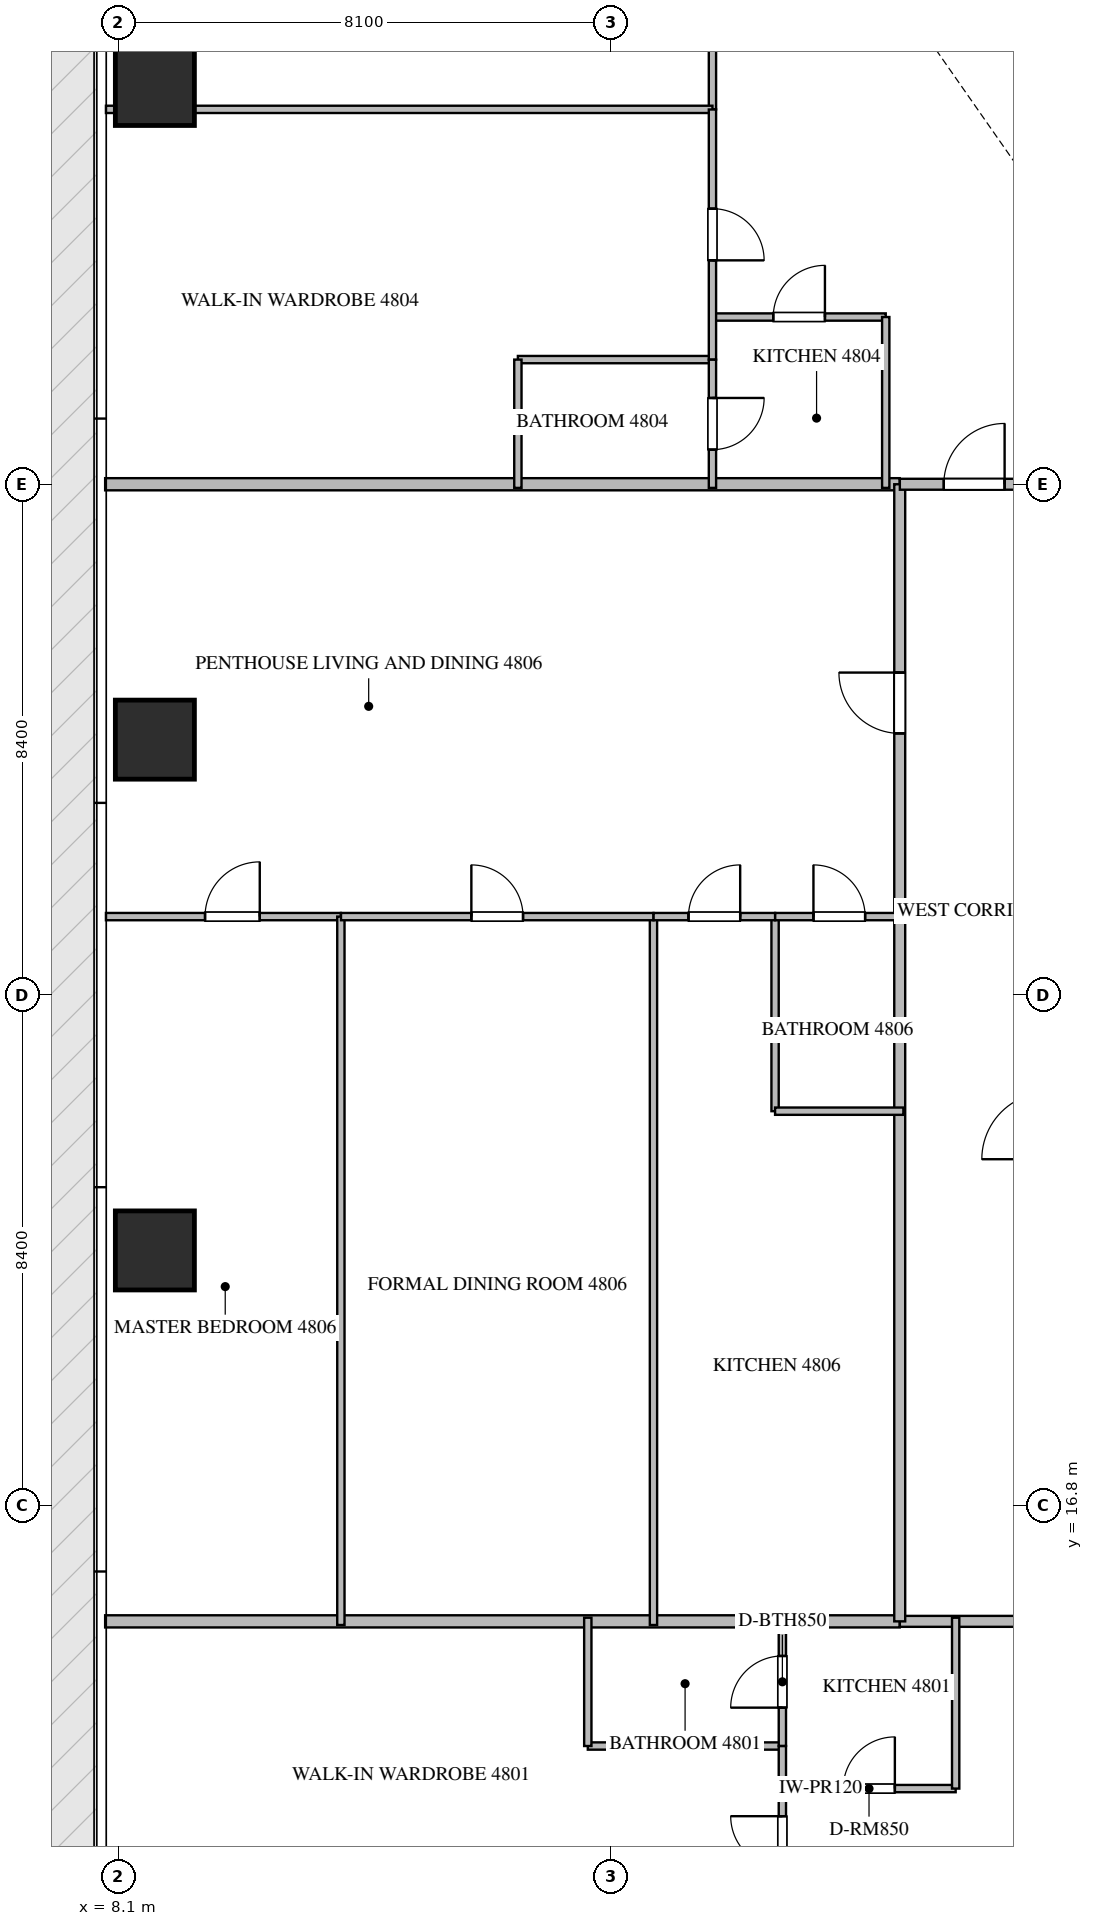
"""IFC4 building model, lengths in metres.
Left out: names, types, materials, properties, quantities, classifications, styles, units other than length and angle.
Written with IfcOpenShell. Run it as: python <this file> out.ifc"""

import sys

from ifc_helpers import new_model, si_unit, direction, frame, frame_2d, origin, origin_2d, place, context, subcontext, project, spatial, rectangle, extrude, source, transform, mapped, element, fill, save


model = new_model("IFC4")
c1 = context("Model", 3, precision=1e-05, world=origin(), true_north=direction((0.0, 1.0)))
c2 = subcontext(c1, "Body", "Model", "MODEL_VIEW")
j1 = project(units=[si_unit("LENGTHUNIT", "METRE"), si_unit("PLANEANGLEUNIT", "RADIAN")], contexts=[c1])
p1 = place(None, origin())
s1 = spatial("IfcSite", under=j1, at=p1, CompositionType="ELEMENT")
p2 = place(p1, origin())
s2 = spatial("IfcBuilding", under=s1, at=p2, CompositionType="ELEMENT")
p3 = place(p2, frame((0.0, 0.0, 191.4)))
s3 = spatial("IfcBuildingStorey", under=s2, at=p3, CompositionType="ELEMENT", Elevation=191.4)
m1 = source(origin(), c2, "Body", "SweptSolid", [
    extrude(rectangle(XDim=1.3, YDim=1.3, at=origin_2d()), origin(), (0.0, 0.0, 1.0), 3.75),
])
for number, where, z_axis, x_axis in (
    (1, (8.7, 21.0, -0.26), (0.0, 0.0, 1.0), (1.0, 0.0, 0.0)),
    (2, (8.7, 29.4, -0.26), (0.0, 0.0, 1.0), (1.0, 0.0, 0.0)),
    (3, (8.7, 40.15, -0.26), (0.0, 0.0, 1.0), (1.0, 0.0, 0.0)),
):
    element("IfcColumn", number, at=place(p3, frame(where, z_axis=z_axis, x_axis=x_axis)), inside=s3, PredefinedType="COLUMN", context=c2, shape_type="MappedRepresentation", body=[
        mapped(m1, transform((0.0, 0.0, 0.0), scale=1.0)),
    ])
for number, where, z_axis, x_axis in (
    (4, (7.882, 14.9, 0.0), (0.0, 0.0, 1.0), (1.0, 0.0, 0.0)),
    (5, (7.882, 33.6, 0.0), (0.0, 0.0, 1.0), (1.0, 0.0, 0.0)),
):
    element("IfcWall", number, at=place(p3, frame(where, z_axis=z_axis, x_axis=x_axis)), inside=s3, PredefinedType="PARTITIONING", context=c2, shape_type="SweptSolid", body=[
        extrude(rectangle(XDim=13.068, YDim=0.2, at=frame_2d((6.534, 0.0))), origin(), (0.0, 0.0, 1.0), 3.49),
    ])
p4 = place(p3, frame((20.952, 14.9, 0.0), z_axis=(0.0, 0.0, 1.0), x_axis=(1.0, 0.0, 0.0)))
e6 = element("IfcWall", 6, at=p4, inside=s3, PredefinedType="PARTITIONING", context=c2, shape_type="SweptSolid", body=[
    extrude(rectangle(XDim=22.896, YDim=0.18, at=frame_2d((11.448, 0.0))), origin(), (0.0, 0.0, 1.0), 3.49),
])
p5 = place(p4, frame((2.387, 0.0, 0.0)))
e7 = element("IfcOpeningElement", 7, at=p5, cuts=e6, PredefinedType="OPENING", context=c2, shape_type="SweptSolid", body=[
    extrude(rectangle(XDim=1.0, YDim=2.15, at=frame_2d((0.5, 1.075))), frame((0.0, 0.1, 0.0), z_axis=(0.0, -1.0, 0.0), x_axis=(1.0, 0.0, 0.0)), (0.0, 0.0, 1.0), 0.2),
])
p6 = place(p4, frame((14.867, 0.0, 0.0)))
e8 = element("IfcOpeningElement", 8, at=p6, cuts=e6, PredefinedType="OPENING", context=c2, shape_type="SweptSolid", body=[
    extrude(rectangle(XDim=1.0, YDim=2.15, at=frame_2d((0.5, 1.075))), frame((0.0, 0.1, 0.0), z_axis=(0.0, -1.0, 0.0), x_axis=(1.0, 0.0, 0.0)), (0.0, 0.0, 1.0), 0.2),
])
p7 = place(p4, frame((19.356, 0.0, 0.0)))
e9 = element("IfcOpeningElement", 9, at=p7, cuts=e6, PredefinedType="OPENING", context=c2, shape_type="SweptSolid", body=[
    extrude(rectangle(XDim=1.0, YDim=2.15, at=frame_2d((0.5, 1.075))), frame((0.0, 0.1, 0.0), z_axis=(0.0, -1.0, 0.0), x_axis=(1.0, 0.0, 0.0)), (0.0, 0.0, 1.0), 0.2),
])
p8 = place(p3, frame((20.95, 14.9, 0.0), z_axis=(0.0, 0.0, 1.0), x_axis=(0.0, 1.0, 0.0)))
e10 = element("IfcWall", 10, at=p8, inside=s3, PredefinedType="PARTITIONING", context=c2, shape_type="SweptSolid", body=[
    extrude(rectangle(XDim=18.7, YDim=0.18, at=frame_2d((9.35, 0.0))), origin(), (0.0, 0.0, 1.0), 3.49),
])
p9 = place(p8, frame((14.603, 0.0, 0.0)))
e11 = element("IfcOpeningElement", 11, at=p9, cuts=e10, PredefinedType="OPENING", context=c2, shape_type="SweptSolid", body=[
    extrude(rectangle(XDim=1.0, YDim=2.15, at=frame_2d((0.5, 1.075))), frame((0.0, 0.1, 0.0), z_axis=(0.0, -1.0, 0.0), x_axis=(1.0, 0.0, 0.0)), (0.0, 0.0, 1.0), 0.2),
])
p10 = place(p3, frame((20.952, 33.6, 0.0), z_axis=(0.0, 0.0, 1.0), x_axis=(1.0, 0.0, 0.0)))
e12 = element("IfcWall", 12, at=p10, inside=s3, PredefinedType="PARTITIONING", context=c2, shape_type="SweptSolid", body=[
    extrude(rectangle(XDim=2.446, YDim=0.18, at=frame_2d((1.223, 0.0))), origin(), (0.0, 0.0, 1.0), 3.49),
])
p11 = place(p10, frame((0.723, 0.0, 0.0)))
e13 = element("IfcOpeningElement", 13, at=p11, cuts=e12, PredefinedType="OPENING", context=c2, shape_type="SweptSolid", body=[
    extrude(rectangle(XDim=1.0, YDim=2.15, at=frame_2d((0.5, 1.075))), frame((0.0, 0.1, 0.0), z_axis=(0.0, -1.0, 0.0), x_axis=(1.0, 0.0, 0.0)), (0.0, 0.0, 1.0), 0.2),
])
p12 = place(p3, frame((19.02, 12.15, 0.0), z_axis=(0.0, 0.0, 1.0), x_axis=(1.0, 0.0, 0.0)))
e14 = element("IfcWall", 14, at=p12, inside=s3, PredefinedType="PARTITIONING", context=c2, shape_type="SweptSolid", body=[
    extrude(rectangle(XDim=2.85, YDim=0.12, at=frame_2d((1.425, 0.0))), origin(), (0.0, 0.0, 1.0), 3.49),
])
p13 = place(p12, frame((1.0, 0.0, 0.0)))
e15 = element("IfcOpeningElement", 15, at=p13, cuts=e14, PredefinedType="OPENING", context=c2, shape_type="SweptSolid", body=[
    extrude(rectangle(XDim=0.85, YDim=2.1, at=frame_2d((0.425, 1.05))), frame((0.0, 0.07, 0.0), z_axis=(0.0, -1.0, 0.0), x_axis=(1.0, 0.0, 0.0)), (0.0, 0.0, 1.0), 0.14),
])
p14 = place(p3, frame((21.87, 12.15, 0.0), z_axis=(0.0, 0.0, 1.0), x_axis=(0.0, 1.0, 0.0)))
e16 = element("IfcWall", 16, at=p14, inside=s3, PredefinedType="PARTITIONING", context=c2, shape_type="SweptSolid", body=[
    extrude(rectangle(XDim=2.81, YDim=0.12, at=frame_2d((1.405, 0.0))), origin(), (0.0, 0.0, 1.0), 3.49),
])
p15 = place(p3, frame((15.82, 12.85, 0.0), z_axis=(0.0, 0.0, 1.0), x_axis=(1.0, 0.0, 0.0)))
e17 = element("IfcWall", 17, at=p15, inside=s3, PredefinedType="PARTITIONING", context=c2, shape_type="SweptSolid", body=[
    extrude(rectangle(XDim=3.2, YDim=0.12, at=frame_2d((1.6, 0.0))), origin(), (0.0, 0.0, 1.0), 3.49),
])
p16 = place(p3, frame((15.82, 12.85, 0.0), z_axis=(0.0, 0.0, 1.0), x_axis=(0.0, 1.0, 0.0)))
e18 = element("IfcWall", 18, at=p16, inside=s3, PredefinedType="PARTITIONING", context=c2, shape_type="SweptSolid", body=[
    extrude(rectangle(XDim=2.11, YDim=0.12, at=frame_2d((1.055, 0.0))), origin(), (0.0, 0.0, 1.0), 3.49),
])
p17 = place(p3, frame((19.02, 9.692, 0.0), z_axis=(0.0, 0.0, 1.0), x_axis=(0.0, 1.0, 0.0)))
e19 = element("IfcWall", 19, at=p17, inside=s3, PredefinedType="PARTITIONING", context=c2, shape_type="SweptSolid", body=[
    extrude(rectangle(XDim=3.158, YDim=0.12, at=frame_2d((1.579, 0.0))), origin(), (0.0, 0.0, 1.0), 3.49),
])
p18 = place(p17, frame((1.154, 0.0, 0.0)))
e20 = element("IfcOpeningElement", 20, at=p18, cuts=e19, PredefinedType="OPENING", context=c2, shape_type="SweptSolid", body=[
    extrude(rectangle(XDim=0.85, YDim=2.1, at=frame_2d((0.425, 1.05))), frame((0.0, 0.07, 0.0), z_axis=(0.0, -1.0, 0.0), x_axis=(1.0, 0.0, 0.0)), (0.0, 0.0, 1.0), 0.14),
])
p19 = place(p3, frame((19.02, 12.852, 0.0), z_axis=(0.0, 0.0, 1.0), x_axis=(0.0, 1.0, 0.0)))
e21 = element("IfcWall", 21, at=p19, inside=s3, PredefinedType="PARTITIONING", context=c2, shape_type="SweptSolid", body=[
    extrude(rectangle(XDim=2.108, YDim=0.12, at=frame_2d((1.054, 0.0))), origin(), (0.0, 0.0, 1.0), 3.49),
])
p20 = place(p19, frame((0.629, 0.0, 0.0)))
e22 = element("IfcOpeningElement", 22, at=p20, cuts=e21, PredefinedType="OPENING", context=c2, shape_type="SweptSolid", body=[
    extrude(rectangle(XDim=0.85, YDim=2.1, at=frame_2d((0.425, 1.05))), frame((0.0, 0.07, 0.0), z_axis=(0.0, -1.0, 0.0), x_axis=(1.0, 0.0, 0.0)), (0.0, 0.0, 1.0), 0.14),
])
p21 = place(p3, frame((17.87, 36.35, 0.0), z_axis=(0.0, 0.0, 1.0), x_axis=(1.0, 0.0, 0.0)))
e23 = element("IfcWall", 23, at=p21, inside=s3, PredefinedType="PARTITIONING", context=c2, shape_type="SweptSolid", body=[
    extrude(rectangle(XDim=2.85, YDim=0.12, at=frame_2d((1.425, 0.0))), origin(), (0.0, 0.0, 1.0), 3.49),
])
p22 = place(p21, frame((1.0, 0.0, 0.0)))
e24 = element("IfcOpeningElement", 24, at=p22, cuts=e23, PredefinedType="OPENING", context=c2, shape_type="SweptSolid", body=[
    extrude(rectangle(XDim=0.85, YDim=2.1, at=frame_2d((0.425, 1.05))), frame((0.0, 0.07, 0.0), z_axis=(0.0, -1.0, 0.0), x_axis=(1.0, 0.0, 0.0)), (0.0, 0.0, 1.0), 0.14),
])
p23 = place(p3, frame((20.72, 36.35, 0.0), z_axis=(0.0, 0.0, 1.0), x_axis=(0.0, -1.0, 0.0)))
e25 = element("IfcWall", 25, at=p23, inside=s3, PredefinedType="PARTITIONING", context=c2, shape_type="SweptSolid", body=[
    extrude(rectangle(XDim=2.81, YDim=0.12, at=frame_2d((1.405, 0.0))), origin(), (0.0, 0.0, 1.0), 3.49),
])
p24 = place(p3, frame((17.87, 48.905, 0.0), z_axis=(0.0, 0.0, 1.0), x_axis=(0.0, -1.0, 0.0)))
e26 = element("IfcWall", 26, at=p24, inside=s3, PredefinedType="PARTITIONING", context=c2, shape_type="SweptSolid", body=[
    extrude(rectangle(XDim=9.14, YDim=0.12, at=frame_2d((4.57, 0.0))), origin(), (0.0, 0.0, 1.0), 3.49),
])
p25 = place(p24, frame((4.532, 0.0, 0.0)))
e27 = element("IfcOpeningElement", 27, at=p25, cuts=e26, PredefinedType="OPENING", context=c2, shape_type="SweptSolid", body=[
    extrude(rectangle(XDim=0.9, YDim=2.1, at=frame_2d((0.45, 1.05))), frame((0.0, 0.07, 0.0), z_axis=(0.0, -1.0, 0.0), x_axis=(1.0, 0.0, 0.0)), (0.0, 0.0, 1.0), 0.14),
])
p26 = place(p3, frame((7.895, 39.765, 0.0), z_axis=(0.0, 0.0, 1.0), x_axis=(1.0, 0.0, 0.0)))
e28 = element("IfcWall", 28, at=p26, inside=s3, PredefinedType="PARTITIONING", context=c2, shape_type="SweptSolid", body=[
    extrude(rectangle(XDim=9.975, YDim=0.12, at=frame_2d((4.988, 0.0))), origin(), (0.0, 0.0, 1.0), 3.49),
])
p27 = place(p3, frame((14.67, 35.65, 0.0), z_axis=(0.0, 0.0, 1.0), x_axis=(1.0, 0.0, 0.0)))
e29 = element("IfcWall", 29, at=p27, inside=s3, PredefinedType="PARTITIONING", context=c2, shape_type="SweptSolid", body=[
    extrude(rectangle(XDim=3.2, YDim=0.12, at=frame_2d((1.6, 0.0))), origin(), (0.0, 0.0, 1.0), 3.49),
])
p28 = place(p3, frame((14.67, 35.65, 0.0), z_axis=(0.0, 0.0, 1.0), x_axis=(0.0, -1.0, 0.0)))
e30 = element("IfcWall", 30, at=p28, inside=s3, PredefinedType="PARTITIONING", context=c2, shape_type="SweptSolid", body=[
    extrude(rectangle(XDim=2.11, YDim=0.12, at=frame_2d((1.055, 0.0))), origin(), (0.0, 0.0, 1.0), 3.49),
])
p29 = place(p3, frame((17.87, 39.763, 0.0), z_axis=(0.0, 0.0, 1.0), x_axis=(0.0, -1.0, 0.0)))
e31 = element("IfcWall", 31, at=p29, inside=s3, PredefinedType="PARTITIONING", context=c2, shape_type="SweptSolid", body=[
    extrude(rectangle(XDim=4.113, YDim=0.12, at=frame_2d((2.057, 0.0))), origin(), (0.0, 0.0, 1.0), 3.49),
])
p30 = place(p29, frame((1.631, 0.0, 0.0)))
e32 = element("IfcOpeningElement", 32, at=p30, cuts=e31, PredefinedType="OPENING", context=c2, shape_type="SweptSolid", body=[
    extrude(rectangle(XDim=0.85, YDim=2.1, at=frame_2d((0.425, 1.05))), frame((0.0, 0.07, 0.0), z_axis=(0.0, -1.0, 0.0), x_axis=(1.0, 0.0, 0.0)), (0.0, 0.0, 1.0), 0.14),
])
p31 = place(p3, frame((17.87, 35.648, 0.0), z_axis=(0.0, 0.0, 1.0), x_axis=(0.0, -1.0, 0.0)))
e33 = element("IfcWall", 33, at=p31, inside=s3, PredefinedType="PARTITIONING", context=c2, shape_type="SweptSolid", body=[
    extrude(rectangle(XDim=2.108, YDim=0.12, at=frame_2d((1.054, 0.0))), origin(), (0.0, 0.0, 1.0), 3.49),
])
p32 = place(p31, frame((0.629, 0.0, 0.0)))
e34 = element("IfcOpeningElement", 34, at=p32, cuts=e33, PredefinedType="OPENING", context=c2, shape_type="SweptSolid", body=[
    extrude(rectangle(XDim=0.85, YDim=2.1, at=frame_2d((0.425, 1.05))), frame((0.0, 0.07, 0.0), z_axis=(0.0, -1.0, 0.0), x_axis=(1.0, 0.0, 0.0)), (0.0, 0.0, 1.0), 0.14),
])
p33 = place(p3, frame((7.895, 26.49, 0.0), z_axis=(0.0, 0.0, 1.0), x_axis=(1.0, 0.0, 0.0)))
e35 = element("IfcWall", 35, at=p33, inside=s3, PredefinedType="PARTITIONING", context=c2, shape_type="SweptSolid", body=[
    extrude(rectangle(XDim=3.864, YDim=0.12, at=frame_2d((1.932, 0.0))), origin(), (0.0, 0.0, 1.0), 3.49),
])
p34 = place(p33, frame((1.63, 0.0, 0.0)))
e36 = element("IfcOpeningElement", 36, at=p34, cuts=e35, PredefinedType="OPENING", context=c2, shape_type="SweptSolid", body=[
    extrude(rectangle(XDim=0.9, YDim=2.1, at=frame_2d((0.45, 1.05))), frame((0.0, 0.07, 0.0), z_axis=(0.0, -1.0, 0.0), x_axis=(1.0, 0.0, 0.0)), (0.0, 0.0, 1.0), 0.14),
])
p35 = place(p3, frame((11.759, 14.84, 0.0), z_axis=(0.0, 0.0, 1.0), x_axis=(0.0, 1.0, 0.0)))
e37 = element("IfcWall", 37, at=p35, inside=s3, PredefinedType="PARTITIONING", context=c2, shape_type="SweptSolid", body=[
    extrude(rectangle(XDim=11.65, YDim=0.12, at=frame_2d((5.825, 0.0))), origin(), (0.0, 0.0, 1.0), 3.49),
])
p36 = place(p3, frame((16.9, 14.84, 0.0), z_axis=(0.0, 0.0, 1.0), x_axis=(0.0, 1.0, 0.0)))
e38 = element("IfcWall", 38, at=p36, inside=s3, PredefinedType="PARTITIONING", context=c2, shape_type="SweptSolid", body=[
    extrude(rectangle(XDim=11.65, YDim=0.12, at=frame_2d((5.825, 0.0))), origin(), (0.0, 0.0, 1.0), 2.972),
])
p37 = place(p3, frame((18.9, 23.29, 0.0), z_axis=(0.0, 0.0, 1.0), x_axis=(0.0, 1.0, 0.0)))
e39 = element("IfcWall", 39, at=p37, inside=s3, PredefinedType="PARTITIONING", context=c2, shape_type="SweptSolid", body=[
    extrude(rectangle(XDim=3.2, YDim=0.12, at=frame_2d((1.6, 0.0))), origin(), (0.0, 0.0, 1.0), 3.49),
])
p38 = place(p3, frame((18.9, 23.29, 0.0), z_axis=(0.0, 0.0, 1.0), x_axis=(1.0, 0.0, 0.0)))
e40 = element("IfcWall", 40, at=p38, inside=s3, PredefinedType="PARTITIONING", context=c2, shape_type="SweptSolid", body=[
    extrude(rectangle(XDim=2.11, YDim=0.12, at=frame_2d((1.055, 0.0))), origin(), (0.0, 0.0, 1.0), 3.49),
])
p39 = place(p3, frame((11.761, 26.49, 0.0), z_axis=(0.0, 0.0, 1.0), x_axis=(1.0, 0.0, 0.0)))
e41 = element("IfcWall", 41, at=p39, inside=s3, PredefinedType="PARTITIONING", context=c2, shape_type="SweptSolid", body=[
    extrude(rectangle(XDim=5.139, YDim=0.12, at=frame_2d((2.569, 0.0))), origin(), (0.0, 0.0, 1.0), 3.49),
])
p40 = place(p39, frame((2.144, 0.0, 0.0)))
e42 = element("IfcOpeningElement", 42, at=p40, cuts=e41, PredefinedType="OPENING", context=c2, shape_type="SweptSolid", body=[
    extrude(rectangle(XDim=0.85, YDim=2.1, at=frame_2d((0.425, 1.05))), frame((0.0, 0.07, 0.0), z_axis=(0.0, -1.0, 0.0), x_axis=(1.0, 0.0, 0.0)), (0.0, 0.0, 1.0), 0.14),
])
p41 = place(p3, frame((16.902, 26.49, 0.0), z_axis=(0.0, 0.0, 1.0), x_axis=(1.0, 0.0, 0.0)))
e43 = element("IfcWall", 43, at=p41, inside=s3, PredefinedType="PARTITIONING", context=c2, shape_type="SweptSolid", body=[
    extrude(rectangle(XDim=1.998, YDim=0.12, at=frame_2d((0.999, 0.0))), origin(), (0.0, 0.0, 1.0), 3.49),
])
p42 = place(p41, frame((0.574, 0.0, 0.0)))
e44 = element("IfcOpeningElement", 44, at=p42, cuts=e43, PredefinedType="OPENING", context=c2, shape_type="SweptSolid", body=[
    extrude(rectangle(XDim=0.85, YDim=2.1, at=frame_2d((0.425, 1.05))), frame((0.0, 0.07, 0.0), z_axis=(0.0, -1.0, 0.0), x_axis=(1.0, 0.0, 0.0)), (0.0, 0.0, 1.0), 0.14),
])
p43 = place(p3, frame((18.902, 26.49, 0.0), z_axis=(0.0, 0.0, 1.0), x_axis=(1.0, 0.0, 0.0)))
e45 = element("IfcWall", 45, at=p43, inside=s3, PredefinedType="PARTITIONING", context=c2, shape_type="SweptSolid", body=[
    extrude(rectangle(XDim=2.108, YDim=0.12, at=frame_2d((1.054, 0.0))), origin(), (0.0, 0.0, 1.0), 3.49),
])
p44 = place(p43, frame((0.629, 0.0, 0.0)))
e46 = element("IfcOpeningElement", 46, at=p44, cuts=e45, PredefinedType="OPENING", context=c2, shape_type="SweptSolid", body=[
    extrude(rectangle(XDim=0.85, YDim=2.1, at=frame_2d((0.425, 1.05))), frame((0.0, 0.07, 0.0), z_axis=(0.0, -1.0, 0.0), x_axis=(1.0, 0.0, 0.0)), (0.0, 0.0, 1.0), 0.14),
])
m2 = source(origin(), c2, "Body", "SweptSolid", [
    extrude(rectangle(XDim=1.0, YDim=2.15, at=frame_2d((0.5, 1.075))), frame((0.0, 0.025, 0.0), z_axis=(0.0, -1.0, 0.0), x_axis=(1.0, 0.0, 0.0)), (0.0, 0.0, 1.0), 0.05),
])
p45 = place(p9, origin())
e47 = element("IfcDoor", 47, at=p45, inside=s3, OperationType="SINGLE_SWING_RIGHT", PredefinedType="DOOR", context=c2, shape_type="MappedRepresentation", body=[
    mapped(m2, transform((0.0, 0.0, 0.0), scale=1.0)),
])
fill(e11, e47)
p46 = place(p11, origin())
e48 = element("IfcDoor", 48, at=p46, inside=s3, OperationType="SINGLE_SWING_RIGHT", PredefinedType="DOOR", context=c2, shape_type="MappedRepresentation", body=[
    mapped(m2, transform((0.0, 0.0, 0.0), scale=1.0)),
])
fill(e13, e48)
m3 = source(origin(), c2, "Body", "SweptSolid", [
    extrude(rectangle(XDim=0.85, YDim=2.1, at=frame_2d((0.425, 1.05))), frame((0.0, 0.025, 0.0), z_axis=(0.0, -1.0, 0.0), x_axis=(1.0, 0.0, 0.0)), (0.0, 0.0, 1.0), 0.05),
])
p47 = place(p13, origin())
e49 = element("IfcDoor", 49, at=p47, inside=s3, OperationType="SINGLE_SWING_RIGHT", PredefinedType="DOOR", context=c2, shape_type="MappedRepresentation", body=[
    mapped(m3, transform((0.0, 0.0, 0.0), scale=1.0)),
])
fill(e15, e49)
p48 = place(p18, origin())
e50 = element("IfcDoor", 50, at=p48, inside=s3, OperationType="SINGLE_SWING_RIGHT", PredefinedType="DOOR", context=c2, shape_type="MappedRepresentation", body=[
    mapped(m3, transform((0.0, 0.0, 0.0), scale=1.0)),
])
fill(e20, e50)
p49 = place(p20, origin())
e51 = element("IfcDoor", 51, at=p49, inside=s3, OperationType="SINGLE_SWING_LEFT", PredefinedType="DOOR", context=c2, shape_type="MappedRepresentation", body=[
    mapped(m3, transform((0.0, 0.0, 0.0), scale=1.0)),
])
fill(e22, e51)
p50 = place(p22, origin())
e52 = element("IfcDoor", 52, at=p50, inside=s3, OperationType="SINGLE_SWING_RIGHT", PredefinedType="DOOR", context=c2, shape_type="MappedRepresentation", body=[
    mapped(m3, transform((0.0, 0.0, 0.0), scale=1.0)),
])
fill(e24, e52)
p51 = place(p30, origin())
e53 = element("IfcDoor", 53, at=p51, inside=s3, OperationType="SINGLE_SWING_RIGHT", PredefinedType="DOOR", context=c2, shape_type="MappedRepresentation", body=[
    mapped(m3, transform((0.0, 0.0, 0.0), scale=1.0)),
])
fill(e32, e53)
p52 = place(p32, origin())
e54 = element("IfcDoor", 54, at=p52, inside=s3, OperationType="SINGLE_SWING_LEFT", PredefinedType="DOOR", context=c2, shape_type="MappedRepresentation", body=[
    mapped(m3, transform((0.0, 0.0, 0.0), scale=1.0)),
])
fill(e34, e54)
m4 = source(origin(), c2, "Body", "SweptSolid", [
    extrude(rectangle(XDim=0.9, YDim=2.1, at=frame_2d((0.45, 1.05))), frame((0.0, 0.025, 0.0), z_axis=(0.0, -1.0, 0.0), x_axis=(1.0, 0.0, 0.0)), (0.0, 0.0, 1.0), 0.05),
])
p53 = place(p34, origin())
e55 = element("IfcDoor", 55, at=p53, inside=s3, OperationType="SINGLE_SWING_RIGHT", PredefinedType="DOOR", context=c2, shape_type="MappedRepresentation", body=[
    mapped(m4, transform((0.0, 0.0, 0.0), scale=1.0)),
])
fill(e36, e55)
p54 = place(p40, origin())
e56 = element("IfcDoor", 56, at=p54, inside=s3, OperationType="SINGLE_SWING_LEFT", PredefinedType="DOOR", context=c2, shape_type="MappedRepresentation", body=[
    mapped(m3, transform((0.0, 0.0, 0.0), scale=1.0)),
])
fill(e42, e56)
p55 = place(p42, origin())
e57 = element("IfcDoor", 57, at=p55, inside=s3, OperationType="SINGLE_SWING_RIGHT", PredefinedType="DOOR", context=c2, shape_type="MappedRepresentation", body=[
    mapped(m3, transform((0.0, 0.0, 0.0), scale=1.0)),
])
fill(e44, e57)
p56 = place(p44, origin())
e58 = element("IfcDoor", 58, at=p56, inside=s3, OperationType="SINGLE_SWING_LEFT", PredefinedType="DOOR", context=c2, shape_type="MappedRepresentation", body=[
    mapped(m3, transform((0.0, 0.0, 0.0), scale=1.0)),
])
fill(e46, e58)
save(model, sys.argv[1])
